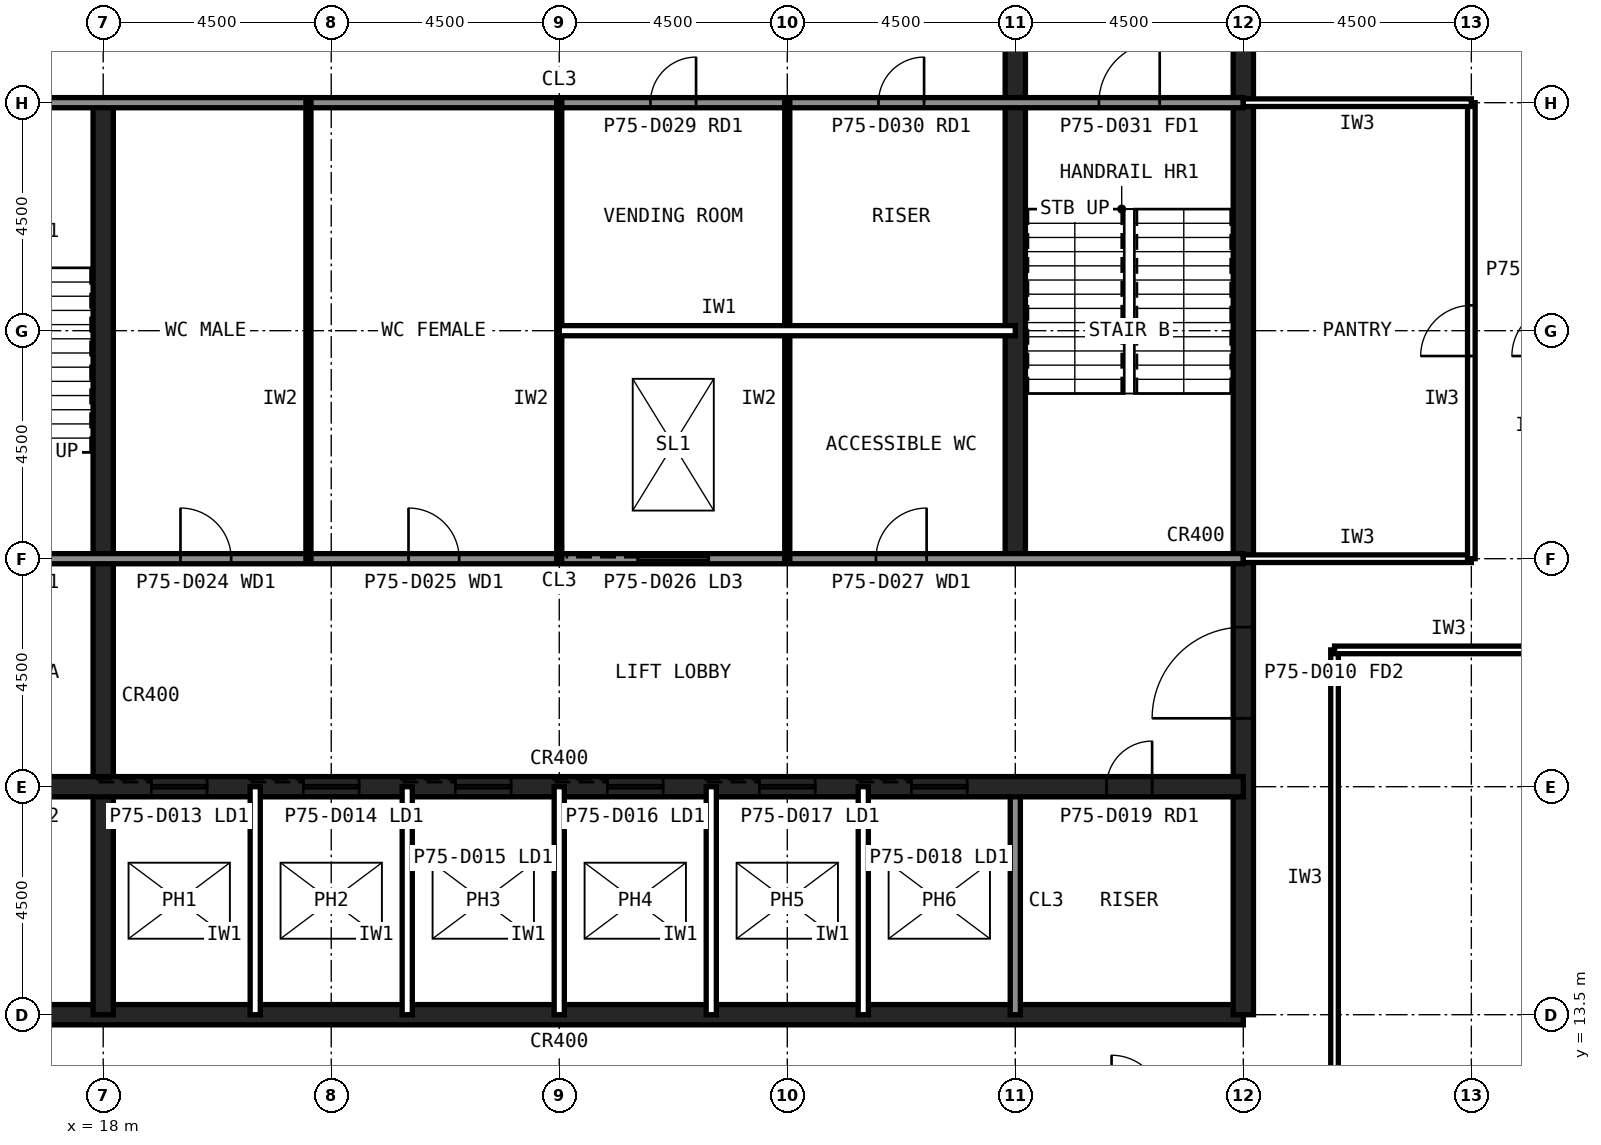
"""IFC4 building model, lengths in metres.
Left out: names, types, materials, properties, quantities, classifications, styles, units other than length and angle.
Written with IfcOpenShell. Run it as: python <this file> out.ifc"""

import sys

from ifc_helpers import new_model, si_unit, direction, frame, frame_2d, origin, place, context, subcontext, project, spatial, rectangle, extrude, element, fill, save


model = new_model("IFC4")
c1 = context("Model", 3, precision=1e-05, world=origin(), true_north=direction((0.0, 1.0)))
c2 = subcontext(c1, "Body", "Model", "MODEL_VIEW")
j1 = project(units=[si_unit("LENGTHUNIT", "METRE"), si_unit("PLANEANGLEUNIT", "RADIAN")], contexts=[c1])
p1 = place(None, origin())
s1 = spatial("IfcSite", under=j1, at=p1, CompositionType="ELEMENT")
p2 = place(p1, origin())
s2 = spatial("IfcBuilding", under=s1, at=p2, CompositionType="ELEMENT")
p3 = place(p2, frame((0.0, 0.0, 315.1)))
s3 = spatial("IfcBuildingStorey", under=s2, at=p3, CompositionType="ELEMENT", Elevation=315.1)
p4 = place(p3, frame((13.5, 13.5, 0.0), z_axis=(0.0, 0.0, 1.0), x_axis=(1.0, 0.0, 0.0)))
e1 = element("IfcWall", 1, at=p4, inside=s3, PredefinedType="SHEAR", context=c2, shape_type="SweptSolid", body=[
    extrude(rectangle(XDim=27.0, YDim=0.4, at=frame_2d((13.5, 0.0))), origin(), (0.0, 0.0, 1.0), 5.0),
])
p5 = place(p3, frame((40.5, 13.5, 0.0), z_axis=(0.0, 0.0, 1.0), x_axis=(0.0, 1.0, 0.0)))
e2 = element("IfcWall", 2, at=p5, inside=s3, PredefinedType="SHEAR", context=c2, shape_type="SweptSolid", body=[
    extrude(rectangle(XDim=27.0, YDim=0.4, at=frame_2d((13.5, 0.0))), origin(), (0.0, 0.0, 1.0), 5.0),
])
p6 = place(p5, frame((5.85, 0.0, 0.0)))
e3 = element("IfcOpeningElement", 3, at=p6, cuts=e2, PredefinedType="OPENING", context=c2, shape_type="SweptSolid", body=[
    extrude(rectangle(XDim=1.8, YDim=2.1, at=frame_2d((0.9, 1.05))), frame((0.0, 0.21, 0.0), z_axis=(0.0, -1.0, 0.0), x_axis=(1.0, 0.0, 0.0)), (0.0, 0.0, 1.0), 0.42),
])
p7 = place(p5, frame((19.65, 0.0, 0.0)))
e4 = element("IfcOpeningElement", 4, at=p7, cuts=e2, PredefinedType="OPENING", context=c2, shape_type="SweptSolid", body=[
    extrude(rectangle(XDim=1.2, YDim=2.1, at=frame_2d((0.6, 1.05))), frame((0.0, 0.21, 0.0), z_axis=(0.0, -1.0, 0.0), x_axis=(1.0, 0.0, 0.0)), (0.0, 0.0, 1.0), 0.42),
])
p8 = place(p3, frame((18.0, 13.5, 0.0), z_axis=(0.0, 0.0, 1.0), x_axis=(0.0, 1.0, 0.0)))
e5 = element("IfcWall", 5, at=p8, inside=s3, PredefinedType="SHEAR", context=c2, shape_type="SweptSolid", body=[
    extrude(rectangle(XDim=18.0, YDim=0.4, at=frame_2d((9.0, 0.0))), origin(), (0.0, 0.0, 1.0), 5.0),
])
p9 = place(p3, frame((36.0, 13.5, 0.0), z_axis=(0.0, 0.0, 1.0), x_axis=(0.0, 1.0, 0.0)))
e6 = element("IfcWall", 6, at=p9, inside=s3, PredefinedType="SOLIDWALL", context=c2, shape_type="SweptSolid", body=[
    extrude(rectangle(XDim=4.5, YDim=0.2, at=frame_2d((2.25, 0.0))), origin(), (0.0, 0.0, 1.0), 4.8),
])
p10 = place(p3, frame((36.0, 22.5, 0.0), z_axis=(0.0, 0.0, 1.0), x_axis=(0.0, 1.0, 0.0)))
e7 = element("IfcWall", 7, at=p10, inside=s3, PredefinedType="SHEAR", context=c2, shape_type="SweptSolid", body=[
    extrude(rectangle(XDim=18.0, YDim=0.4, at=frame_2d((9.0, 0.0))), origin(), (0.0, 0.0, 1.0), 5.0),
])
p11 = place(p3, frame((13.5, 18.0, 0.0), z_axis=(0.0, 0.0, 1.0), x_axis=(1.0, 0.0, 0.0)))
e8 = element("IfcWall", 8, at=p11, inside=s3, PredefinedType="SHEAR", context=c2, shape_type="SweptSolid", body=[
    extrude(rectangle(XDim=27.0, YDim=0.4, at=frame_2d((13.5, 0.0))), origin(), (0.0, 0.0, 1.0), 5.0),
])
p12 = place(p11, frame((24.3, 0.0, 0.0)))
e9 = element("IfcOpeningElement", 9, at=p12, cuts=e8, PredefinedType="OPENING", context=c2, shape_type="SweptSolid", body=[
    extrude(rectangle(XDim=0.9, YDim=2.1, at=frame_2d((0.45, 1.05))), frame((0.0, 0.21, 0.0), z_axis=(0.0, -1.0, 0.0), x_axis=(1.0, 0.0, 0.0)), (0.0, 0.0, 1.0), 0.42),
])
p13 = place(p11, frame((5.45, 0.0, 0.0)))
e10 = element("IfcOpeningElement", 10, at=p13, cuts=e8, PredefinedType="OPENING", context=c2, shape_type="SweptSolid", body=[
    extrude(rectangle(XDim=1.1, YDim=2.1, at=frame_2d((0.55, 1.05))), frame((0.0, 0.21, 0.0), z_axis=(0.0, -1.0, 0.0), x_axis=(1.0, 0.0, 0.0)), (0.0, 0.0, 1.0), 0.42),
])
p14 = place(p11, frame((8.45, 0.0, 0.0)))
e11 = element("IfcOpeningElement", 11, at=p14, cuts=e8, PredefinedType="OPENING", context=c2, shape_type="SweptSolid", body=[
    extrude(rectangle(XDim=1.1, YDim=2.1, at=frame_2d((0.55, 1.05))), frame((0.0, 0.21, 0.0), z_axis=(0.0, -1.0, 0.0), x_axis=(1.0, 0.0, 0.0)), (0.0, 0.0, 1.0), 0.42),
])
p15 = place(p11, frame((11.45, 0.0, 0.0)))
e12 = element("IfcOpeningElement", 12, at=p15, cuts=e8, PredefinedType="OPENING", context=c2, shape_type="SweptSolid", body=[
    extrude(rectangle(XDim=1.1, YDim=2.1, at=frame_2d((0.55, 1.05))), frame((0.0, 0.21, 0.0), z_axis=(0.0, -1.0, 0.0), x_axis=(1.0, 0.0, 0.0)), (0.0, 0.0, 1.0), 0.42),
])
p16 = place(p11, frame((14.45, 0.0, 0.0)))
e13 = element("IfcOpeningElement", 13, at=p16, cuts=e8, PredefinedType="OPENING", context=c2, shape_type="SweptSolid", body=[
    extrude(rectangle(XDim=1.1, YDim=2.1, at=frame_2d((0.55, 1.05))), frame((0.0, 0.21, 0.0), z_axis=(0.0, -1.0, 0.0), x_axis=(1.0, 0.0, 0.0)), (0.0, 0.0, 1.0), 0.42),
])
p17 = place(p11, frame((17.45, 0.0, 0.0)))
e14 = element("IfcOpeningElement", 14, at=p17, cuts=e8, PredefinedType="OPENING", context=c2, shape_type="SweptSolid", body=[
    extrude(rectangle(XDim=1.1, YDim=2.1, at=frame_2d((0.55, 1.05))), frame((0.0, 0.21, 0.0), z_axis=(0.0, -1.0, 0.0), x_axis=(1.0, 0.0, 0.0)), (0.0, 0.0, 1.0), 0.42),
])
p18 = place(p11, frame((20.45, 0.0, 0.0)))
e15 = element("IfcOpeningElement", 15, at=p18, cuts=e8, PredefinedType="OPENING", context=c2, shape_type="SweptSolid", body=[
    extrude(rectangle(XDim=1.1, YDim=2.1, at=frame_2d((0.55, 1.05))), frame((0.0, 0.21, 0.0), z_axis=(0.0, -1.0, 0.0), x_axis=(1.0, 0.0, 0.0)), (0.0, 0.0, 1.0), 0.42),
])
p19 = place(p11, frame((1.6, 0.0, 0.0)))
e16 = element("IfcOpeningElement", 16, at=p19, cuts=e8, PredefinedType="OPENING", context=c2, shape_type="SweptSolid", body=[
    extrude(rectangle(XDim=1.3, YDim=2.2, at=frame_2d((0.65, 1.1))), frame((0.0, 0.21, 0.0), z_axis=(0.0, -1.0, 0.0), x_axis=(1.0, 0.0, 0.0)), (0.0, 0.0, 1.0), 0.42),
])
p20 = place(p3, frame((13.5, 22.5, 0.0), z_axis=(0.0, 0.0, 1.0), x_axis=(1.0, 0.0, 0.0)))
e17 = element("IfcWall", 17, at=p20, inside=s3, PredefinedType="SOLIDWALL", context=c2, shape_type="SweptSolid", body=[
    extrude(rectangle(XDim=27.0, YDim=0.2, at=frame_2d((13.5, 0.0))), origin(), (0.0, 0.0, 1.0), 4.8),
])
p21 = place(p20, frame((1.65, 0.0, 0.0)))
e18 = element("IfcOpeningElement", 18, at=p21, cuts=e17, PredefinedType="OPENING", context=c2, shape_type="SweptSolid", body=[
    extrude(rectangle(XDim=1.2, YDim=2.1, at=frame_2d((0.6, 1.05))), frame((0.0, 0.11, 0.0), z_axis=(0.0, -1.0, 0.0), x_axis=(1.0, 0.0, 0.0)), (0.0, 0.0, 1.0), 0.22),
])
p22 = place(p20, frame((6.025, 0.0, 0.0)))
e19 = element("IfcOpeningElement", 19, at=p22, cuts=e17, PredefinedType="OPENING", context=c2, shape_type="SweptSolid", body=[
    extrude(rectangle(XDim=1.0, YDim=2.1, at=frame_2d((0.5, 1.05))), frame((0.0, 0.11, 0.0), z_axis=(0.0, -1.0, 0.0), x_axis=(1.0, 0.0, 0.0)), (0.0, 0.0, 1.0), 0.22),
])
p23 = place(p20, frame((10.525, 0.0, 0.0)))
e20 = element("IfcOpeningElement", 20, at=p23, cuts=e17, PredefinedType="OPENING", context=c2, shape_type="SweptSolid", body=[
    extrude(rectangle(XDim=1.0, YDim=2.1, at=frame_2d((0.5, 1.05))), frame((0.0, 0.11, 0.0), z_axis=(0.0, -1.0, 0.0), x_axis=(1.0, 0.0, 0.0)), (0.0, 0.0, 1.0), 0.22),
])
p24 = place(p20, frame((19.75, 0.0, 0.0)))
e21 = element("IfcOpeningElement", 21, at=p24, cuts=e17, PredefinedType="OPENING", context=c2, shape_type="SweptSolid", body=[
    extrude(rectangle(XDim=1.0, YDim=2.1, at=frame_2d((0.5, 1.05))), frame((0.0, 0.11, 0.0), z_axis=(0.0, -1.0, 0.0), x_axis=(1.0, 0.0, 0.0)), (0.0, 0.0, 1.0), 0.22),
])
p25 = place(p20, frame((15.05, 0.0, 0.0)))
e22 = element("IfcOpeningElement", 22, at=p25, cuts=e17, PredefinedType="OPENING", context=c2, shape_type="SweptSolid", body=[
    extrude(rectangle(XDim=1.4, YDim=2.4, at=frame_2d((0.7, 1.2))), frame((0.0, 0.11, 0.0), z_axis=(0.0, -1.0, 0.0), x_axis=(1.0, 0.0, 0.0)), (0.0, 0.0, 1.0), 0.22),
])
p26 = place(p3, frame((13.5, 31.5, 0.0), z_axis=(0.0, 0.0, 1.0), x_axis=(1.0, 0.0, 0.0)))
e23 = element("IfcWall", 23, at=p26, inside=s3, PredefinedType="SOLIDWALL", context=c2, shape_type="SweptSolid", body=[
    extrude(rectangle(XDim=27.0, YDim=0.2, at=frame_2d((13.5, 0.0))), origin(), (0.0, 0.0, 1.0), 4.8),
])
p27 = place(p26, frame((24.15, 0.0, 0.0)))
e24 = element("IfcOpeningElement", 24, at=p27, cuts=e23, PredefinedType="OPENING", context=c2, shape_type="SweptSolid", body=[
    extrude(rectangle(XDim=1.2, YDim=2.1, at=frame_2d((0.6, 1.05))), frame((0.0, 0.11, 0.0), z_axis=(0.0, -1.0, 0.0), x_axis=(1.0, 0.0, 0.0)), (0.0, 0.0, 1.0), 0.22),
])
p28 = place(p26, frame((15.3, 0.0, 0.0)))
e25 = element("IfcOpeningElement", 25, at=p28, cuts=e23, PredefinedType="OPENING", context=c2, shape_type="SweptSolid", body=[
    extrude(rectangle(XDim=0.9, YDim=2.1, at=frame_2d((0.45, 1.05))), frame((0.0, 0.11, 0.0), z_axis=(0.0, -1.0, 0.0), x_axis=(1.0, 0.0, 0.0)), (0.0, 0.0, 1.0), 0.22),
])
p29 = place(p26, frame((19.8, 0.0, 0.0)))
e26 = element("IfcOpeningElement", 26, at=p29, cuts=e23, PredefinedType="OPENING", context=c2, shape_type="SweptSolid", body=[
    extrude(rectangle(XDim=0.9, YDim=2.1, at=frame_2d((0.45, 1.05))), frame((0.0, 0.11, 0.0), z_axis=(0.0, -1.0, 0.0), x_axis=(1.0, 0.0, 0.0)), (0.0, 0.0, 1.0), 0.22),
])
for number, where, z_axis, x_axis in (
    (27, (21.0, 13.5, 0.0), (0.0, 0.0, 1.0), (0.0, 1.0, 0.0)),
    (28, (24.0, 13.5, 0.0), (0.0, 0.0, 1.0), (0.0, 1.0, 0.0)),
    (29, (27.0, 13.5, 0.0), (0.0, 0.0, 1.0), (0.0, 1.0, 0.0)),
    (30, (30.0, 13.5, 0.0), (0.0, 0.0, 1.0), (0.0, 1.0, 0.0)),
    (31, (33.0, 13.5, 0.0), (0.0, 0.0, 1.0), (0.0, 1.0, 0.0)),
):
    element("IfcWall", number, at=place(p3, frame(where, z_axis=z_axis, x_axis=x_axis)), inside=s3, PredefinedType="PARTITIONING", context=c2, shape_type="SweptSolid", body=[
        extrude(rectangle(XDim=4.5, YDim=0.2, at=frame_2d((2.25, 0.0))), origin(), (0.0, 0.0, 1.0), 4.8),
    ])
for number, where, z_axis, x_axis in (
    (32, (22.05, 22.5, 0.0), (0.0, 0.0, 1.0), (0.0, 1.0, 0.0)),
    (33, (27.0, 22.5, 0.0), (0.0, 0.0, 1.0), (0.0, 1.0, 0.0)),
    (34, (31.5, 22.5, 0.0), (0.0, 0.0, 1.0), (0.0, 1.0, 0.0)),
):
    element("IfcWall", number, at=place(p3, frame(where, z_axis=z_axis, x_axis=x_axis)), inside=s3, PredefinedType="PLUMBINGWALL", context=c2, shape_type="SweptSolid", body=[
        extrude(rectangle(XDim=9.0, YDim=0.1, at=frame_2d((4.5, 0.0))), origin(), (0.0, 0.0, 1.0), 4.8),
    ])
p30 = place(p3, frame((27.0, 27.0, 0.0), z_axis=(0.0, 0.0, 1.0), x_axis=(1.0, 0.0, 0.0)))
e35 = element("IfcWall", 35, at=p30, inside=s3, PredefinedType="PARTITIONING", context=c2, shape_type="SweptSolid", body=[
    extrude(rectangle(XDim=9.0, YDim=0.2, at=frame_2d((4.5, 0.0))), origin(), (0.0, 0.0, 1.0), 4.8),
])
p31 = place(p3, frame((42.3, 11.7, 0.0), z_axis=(0.0, 0.0, 1.0), x_axis=(0.0, 1.0, 0.0)))
e36 = element("IfcWall", 36, at=p31, inside=s3, PredefinedType="PARTITIONING", context=c2, shape_type="SweptSolid", body=[
    extrude(rectangle(XDim=9.0, YDim=0.15, at=frame_2d((4.5, 0.0))), origin(), (0.0, 0.0, 1.0), 4.8),
])
p32 = place(p3, frame((42.3, 20.7, 0.0), z_axis=(0.0, 0.0, 1.0), x_axis=(1.0, 0.0, 0.0)))
e37 = element("IfcWall", 37, at=p32, inside=s3, PredefinedType="PARTITIONING", context=c2, shape_type="SweptSolid", body=[
    extrude(rectangle(XDim=4.5, YDim=0.15, at=frame_2d((2.25, 0.0))), origin(), (0.0, 0.0, 1.0), 4.8),
])
p33 = place(p3, frame((40.5, 22.5, 0.0), z_axis=(0.0, 0.0, 1.0), x_axis=(1.0, 0.0, 0.0)))
e38 = element("IfcWall", 38, at=p33, inside=s3, PredefinedType="PARTITIONING", context=c2, shape_type="SweptSolid", body=[
    extrude(rectangle(XDim=4.5, YDim=0.15, at=frame_2d((2.25, 0.0))), origin(), (0.0, 0.0, 1.0), 3.868),
])
p34 = place(p3, frame((45.0, 22.5, 0.0), z_axis=(0.0, 0.0, 1.0), x_axis=(0.0, 1.0, 0.0)))
e39 = element("IfcWall", 39, at=p34, inside=s3, PredefinedType="PARTITIONING", context=c2, shape_type="SweptSolid", body=[
    extrude(rectangle(XDim=9.0, YDim=0.15, at=frame_2d((4.5, 0.0))), origin(), (0.0, 0.0, 1.0), 4.8),
])
p35 = place(p34, frame((4.0, 0.0, 0.0)))
e40 = element("IfcOpeningElement", 40, at=p35, cuts=e39, PredefinedType="OPENING", context=c2, shape_type="SweptSolid", body=[
    extrude(rectangle(XDim=1.0, YDim=2.1, at=frame_2d((0.5, 1.05))), frame((0.0, 0.085, 0.0), z_axis=(0.0, -1.0, 0.0), x_axis=(1.0, 0.0, 0.0)), (0.0, 0.0, 1.0), 0.17),
])
p36 = place(p3, frame((45.0, 31.5, 0.0), z_axis=(0.0, 0.0, 1.0), x_axis=(-1.0, 0.0, 0.0)))
e41 = element("IfcWall", 41, at=p36, inside=s3, PredefinedType="PARTITIONING", context=c2, shape_type="SweptSolid", body=[
    extrude(rectangle(XDim=4.5, YDim=0.15, at=frame_2d((2.25, 0.0))), origin(), (0.0, 0.0, 1.0), 3.868),
])
p37 = place(p6, origin())
e42 = element("IfcDoor", 42, at=p37, inside=s3, OperationType="SINGLE_SWING_LEFT", PredefinedType="DOOR", context=c2, shape_type="SweptSolid", body=[
    extrude(rectangle(XDim=1.8, YDim=2.1, at=frame_2d((0.9, 1.05))), frame((0.0, 0.025, 0.0), z_axis=(0.0, -1.0, 0.0), x_axis=(1.0, 0.0, 0.0)), (0.0, 0.0, 1.0), 0.05),
])
fill(e3, e42)
p38 = place(p27, origin())
e43 = element("IfcDoor", 43, at=p38, inside=s3, OperationType="SINGLE_SWING_RIGHT", PredefinedType="DOOR", context=c2, shape_type="SweptSolid", body=[
    extrude(rectangle(XDim=1.2, YDim=2.1, at=frame_2d((0.6, 1.05))), frame((0.0, 0.025, 0.0), z_axis=(0.0, -1.0, 0.0), x_axis=(1.0, 0.0, 0.0)), (0.0, 0.0, 1.0), 0.05),
])
fill(e24, e43)
p39 = place(p22, origin())
e44 = element("IfcDoor", 44, at=p39, inside=s3, OperationType="SINGLE_SWING_LEFT", PredefinedType="DOOR", context=c2, shape_type="SweptSolid", body=[
    extrude(rectangle(XDim=1.0, YDim=2.1, at=frame_2d((0.5, 1.05))), frame((0.0, 0.025, 0.0), z_axis=(0.0, -1.0, 0.0), x_axis=(1.0, 0.0, 0.0)), (0.0, 0.0, 1.0), 0.05),
])
fill(e19, e44)
p40 = place(p23, origin())
e45 = element("IfcDoor", 45, at=p40, inside=s3, OperationType="SINGLE_SWING_LEFT", PredefinedType="DOOR", context=c2, shape_type="SweptSolid", body=[
    extrude(rectangle(XDim=1.0, YDim=2.1, at=frame_2d((0.5, 1.05))), frame((0.0, 0.025, 0.0), z_axis=(0.0, -1.0, 0.0), x_axis=(1.0, 0.0, 0.0)), (0.0, 0.0, 1.0), 0.05),
])
fill(e20, e45)
p41 = place(p24, origin())
e46 = element("IfcDoor", 46, at=p41, inside=s3, OperationType="SINGLE_SWING_RIGHT", PredefinedType="DOOR", context=c2, shape_type="SweptSolid", body=[
    extrude(rectangle(XDim=1.0, YDim=2.1, at=frame_2d((0.5, 1.05))), frame((0.0, 0.025, 0.0), z_axis=(0.0, -1.0, 0.0), x_axis=(1.0, 0.0, 0.0)), (0.0, 0.0, 1.0), 0.05),
])
fill(e21, e46)
p42 = place(p28, origin())
e47 = element("IfcDoor", 47, at=p42, inside=s3, OperationType="SINGLE_SWING_RIGHT", PredefinedType="DOOR", context=c2, shape_type="SweptSolid", body=[
    extrude(rectangle(XDim=0.9, YDim=2.1, at=frame_2d((0.45, 1.05))), frame((0.0, 0.025, 0.0), z_axis=(0.0, -1.0, 0.0), x_axis=(1.0, 0.0, 0.0)), (0.0, 0.0, 1.0), 0.05),
])
fill(e25, e47)
p43 = place(p29, origin())
e48 = element("IfcDoor", 48, at=p43, inside=s3, OperationType="SINGLE_SWING_RIGHT", PredefinedType="DOOR", context=c2, shape_type="SweptSolid", body=[
    extrude(rectangle(XDim=0.9, YDim=2.1, at=frame_2d((0.45, 1.05))), frame((0.0, 0.025, 0.0), z_axis=(0.0, -1.0, 0.0), x_axis=(1.0, 0.0, 0.0)), (0.0, 0.0, 1.0), 0.05),
])
fill(e26, e48)
p44 = place(p12, origin())
e49 = element("IfcDoor", 49, at=p44, inside=s3, OperationType="SINGLE_SWING_RIGHT", PredefinedType="DOOR", context=c2, shape_type="SweptSolid", body=[
    extrude(rectangle(XDim=0.9, YDim=2.1, at=frame_2d((0.45, 1.05))), frame((0.0, 0.025, 0.0), z_axis=(0.0, -1.0, 0.0), x_axis=(1.0, 0.0, 0.0)), (0.0, 0.0, 1.0), 0.05),
])
fill(e9, e49)
p45 = place(p13, origin())
e50 = element("IfcDoor", 50, at=p45, inside=s3, OperationType="SLIDING_TO_LEFT", PredefinedType="DOOR", context=c2, shape_type="SweptSolid", body=[
    extrude(rectangle(XDim=1.1, YDim=2.1, at=frame_2d((0.55, 1.05))), frame((0.0, 0.025, 0.0), z_axis=(0.0, -1.0, 0.0), x_axis=(1.0, 0.0, 0.0)), (0.0, 0.0, 1.0), 0.05),
])
fill(e10, e50)
p46 = place(p14, origin())
e51 = element("IfcDoor", 51, at=p46, inside=s3, OperationType="SLIDING_TO_LEFT", PredefinedType="DOOR", context=c2, shape_type="SweptSolid", body=[
    extrude(rectangle(XDim=1.1, YDim=2.1, at=frame_2d((0.55, 1.05))), frame((0.0, 0.025, 0.0), z_axis=(0.0, -1.0, 0.0), x_axis=(1.0, 0.0, 0.0)), (0.0, 0.0, 1.0), 0.05),
])
fill(e11, e51)
p47 = place(p15, origin())
e52 = element("IfcDoor", 52, at=p47, inside=s3, OperationType="SLIDING_TO_LEFT", PredefinedType="DOOR", context=c2, shape_type="SweptSolid", body=[
    extrude(rectangle(XDim=1.1, YDim=2.1, at=frame_2d((0.55, 1.05))), frame((0.0, 0.025, 0.0), z_axis=(0.0, -1.0, 0.0), x_axis=(1.0, 0.0, 0.0)), (0.0, 0.0, 1.0), 0.05),
])
fill(e12, e52)
p48 = place(p16, origin())
e53 = element("IfcDoor", 53, at=p48, inside=s3, OperationType="SLIDING_TO_LEFT", PredefinedType="DOOR", context=c2, shape_type="SweptSolid", body=[
    extrude(rectangle(XDim=1.1, YDim=2.1, at=frame_2d((0.55, 1.05))), frame((0.0, 0.025, 0.0), z_axis=(0.0, -1.0, 0.0), x_axis=(1.0, 0.0, 0.0)), (0.0, 0.0, 1.0), 0.05),
])
fill(e13, e53)
p49 = place(p17, origin())
e54 = element("IfcDoor", 54, at=p49, inside=s3, OperationType="SLIDING_TO_LEFT", PredefinedType="DOOR", context=c2, shape_type="SweptSolid", body=[
    extrude(rectangle(XDim=1.1, YDim=2.1, at=frame_2d((0.55, 1.05))), frame((0.0, 0.025, 0.0), z_axis=(0.0, -1.0, 0.0), x_axis=(1.0, 0.0, 0.0)), (0.0, 0.0, 1.0), 0.05),
])
fill(e14, e54)
p50 = place(p18, origin())
e55 = element("IfcDoor", 55, at=p50, inside=s3, OperationType="SLIDING_TO_LEFT", PredefinedType="DOOR", context=c2, shape_type="SweptSolid", body=[
    extrude(rectangle(XDim=1.1, YDim=2.1, at=frame_2d((0.55, 1.05))), frame((0.0, 0.025, 0.0), z_axis=(0.0, -1.0, 0.0), x_axis=(1.0, 0.0, 0.0)), (0.0, 0.0, 1.0), 0.05),
])
fill(e15, e55)
p51 = place(p25, origin())
e56 = element("IfcDoor", 56, at=p51, inside=s3, OperationType="SLIDING_TO_LEFT", PredefinedType="DOOR", context=c2, shape_type="SweptSolid", body=[
    extrude(rectangle(XDim=1.4, YDim=2.4, at=frame_2d((0.7, 1.2))), frame((0.0, 0.025, 0.0), z_axis=(0.0, -1.0, 0.0), x_axis=(1.0, 0.0, 0.0)), (0.0, 0.0, 1.0), 0.05),
])
fill(e22, e56)
p52 = place(p35, origin())
e57 = element("IfcDoor", 57, at=p52, inside=s3, OperationType="SINGLE_SWING_LEFT", PredefinedType="DOOR", context=c2, shape_type="SweptSolid", body=[
    extrude(rectangle(XDim=1.0, YDim=2.1, at=frame_2d((0.5, 1.05))), frame((0.0, 0.025, 0.0), z_axis=(0.0, -1.0, 0.0), x_axis=(1.0, 0.0, 0.0)), (0.0, 0.0, 1.0), 0.05),
])
fill(e40, e57)
save(model, sys.argv[1])
